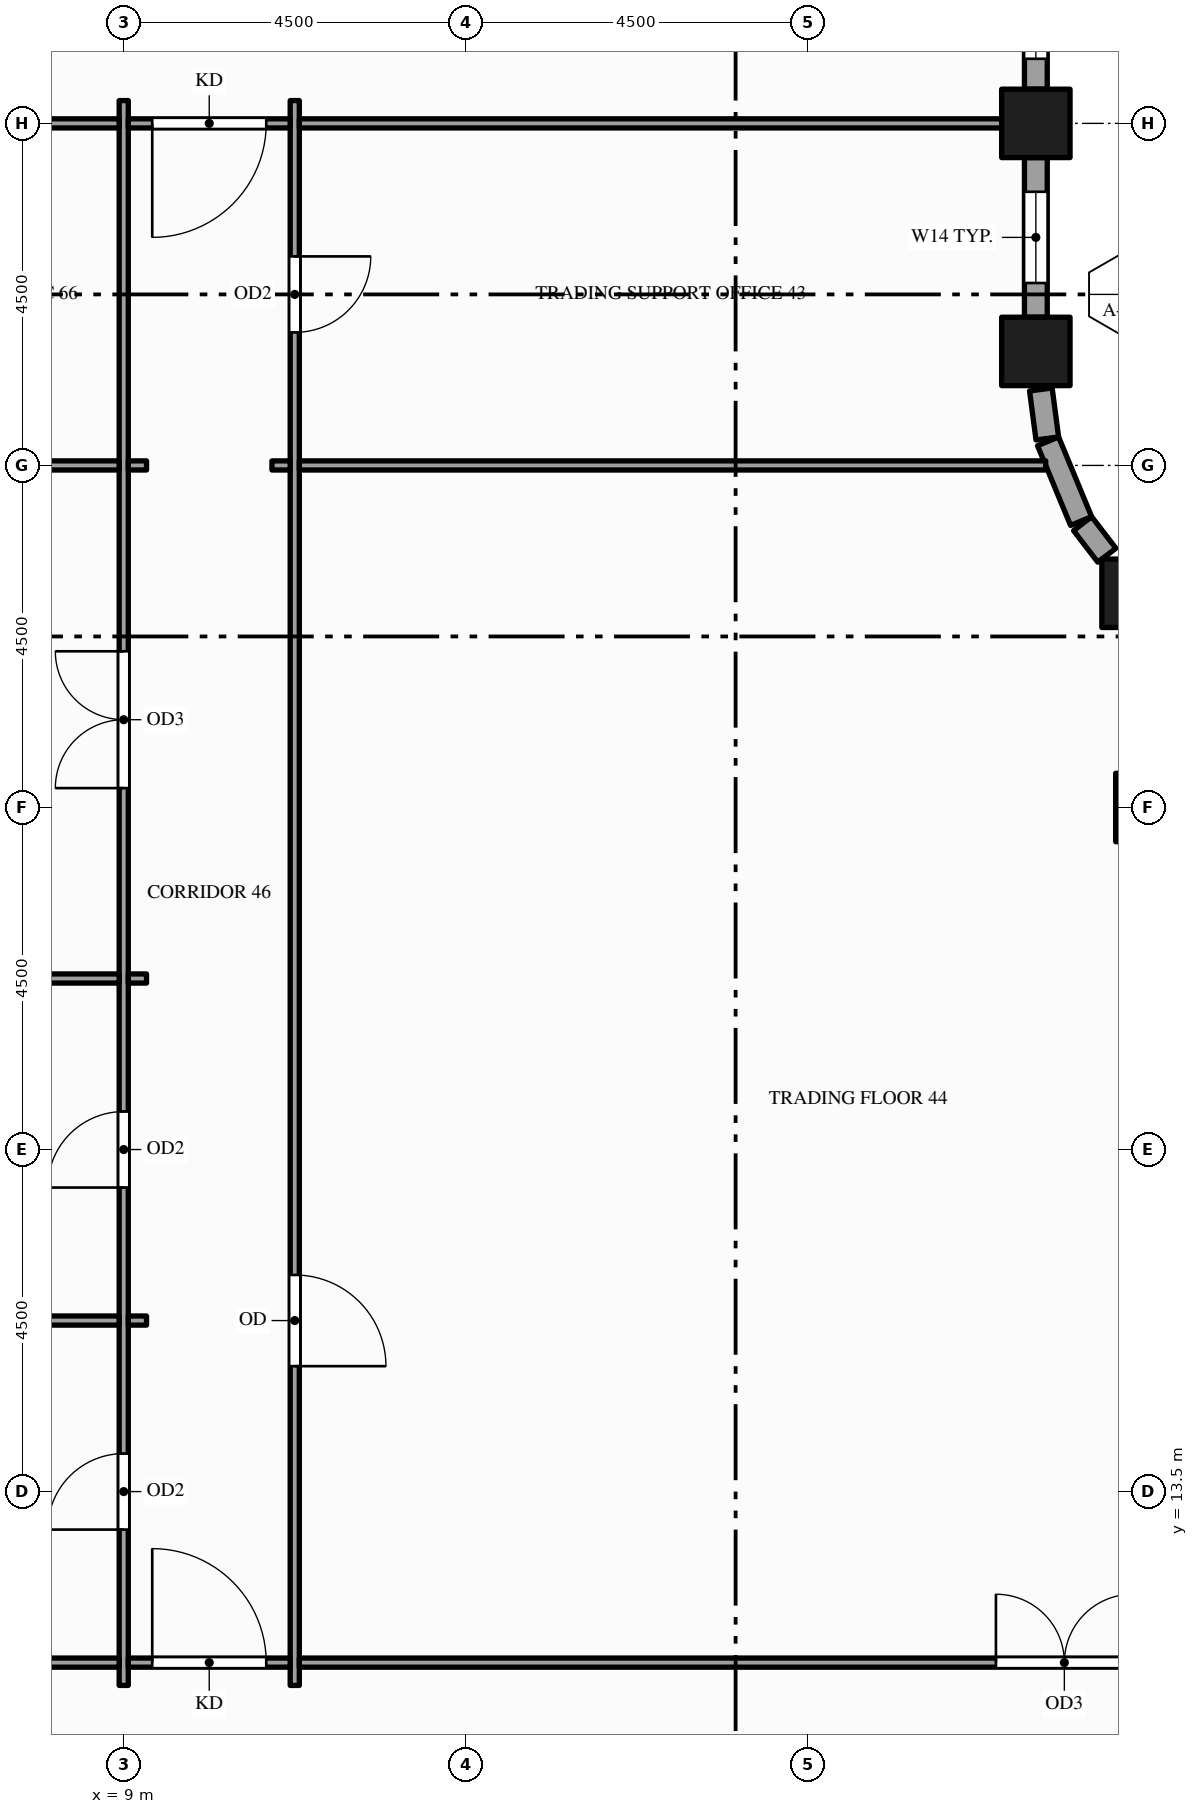
"""IFC4 building model, lengths in metres.
Left out: names, types, materials, properties, quantities, classifications, styles, units other than length and angle.
Written with IfcOpenShell. Run it as: python <this file> out.ifc"""

import sys

from ifc_helpers import new_model, si_unit, direction, frame, frame_2d, origin, origin_2d, place, context, subcontext, project, spatial, rectangle, hollow_rectangle, extrude, element, fill, save


model = new_model("IFC4")
c1 = context("Model", 3, precision=1e-05, world=origin(), true_north=direction((0.0, 1.0)))
c2 = subcontext(c1, "Body", "Model", "MODEL_VIEW")
j1 = project(units=[si_unit("LENGTHUNIT", "METRE"), si_unit("PLANEANGLEUNIT", "RADIAN")], contexts=[c1])
p1 = place(None, origin())
s1 = spatial("IfcSite", under=j1, at=p1, CompositionType="ELEMENT")
p2 = place(p1, origin())
s2 = spatial("IfcBuilding", under=s1, at=p2, CompositionType="ELEMENT")
p3 = place(p2, frame((0.0, 0.0, 147.0)))
s3 = spatial("IfcBuildingStorey", under=s2, at=p3, CompositionType="ELEMENT", Elevation=147.0)
for number, where, z_axis, x_axis in (
    (1, (21.0, 28.5, -0.15), (0.0, 0.0, 1.0), (1.0, 0.0, 0.0)),
    (2, (21.0, 31.5, -0.15), (0.0, 0.0, 1.0), (1.0, 0.0, 0.0)),
    (3, (22.318, 25.318, -0.15), (0.0, 0.0, 1.0), (1.0, 0.0, 0.0)),
    (4, (22.5, 22.5, -0.15), (0.0, 0.0, 1.0), (1.0, 0.0, 0.0)),
):
    element("IfcColumn", number, at=place(p3, frame(where, z_axis=z_axis, x_axis=x_axis)), inside=s3, PredefinedType="COLUMN", context=c2, shape_type="SweptSolid", body=[
        extrude(hollow_rectangle(XDim=0.9, YDim=0.9, WallThickness=0.045, at=origin_2d()), origin(), (0.0, 0.0, 1.0), 4.0),
    ])
p4 = place(p3, frame((21.934, 25.819, 0.0), z_axis=(0.0, 0.0, 1.0), x_axis=(-0.608539141726, 0.793523857856, 0.0)))
e5 = element("IfcWall", 5, at=p4, inside=s3, PredefinedType="STANDARD", context=c2, shape_type="SweptSolid", body=[
    extrude(rectangle(XDim=0.524, YDim=0.3, at=frame_2d((0.262, 0.0))), origin(), (0.0, 0.0, 1.0), 3.149),
])
p5 = place(p3, frame((21.595, 26.268, 0.0), z_axis=(0.0, 0.0, 1.0), x_axis=(-0.382598720491, 0.923914616768, 0.0)))
e6 = element("IfcWall", 6, at=p5, inside=s3, PredefinedType="STANDARD", context=c2, shape_type="SweptSolid", body=[
    extrude(rectangle(XDim=1.135, YDim=0.3, at=frame_2d((0.568, 0.0))), origin(), (0.0, 0.0, 1.0), 3.149),
])
p6 = place(p3, frame((21.151, 27.355, 0.0), z_axis=(0.0, 0.0, 1.0), x_axis=(-0.130687655177, 0.991423590996, 0.0)))
e7 = element("IfcWall", 7, at=p6, inside=s3, PredefinedType="STANDARD", context=c2, shape_type="SweptSolid", body=[
    extrude(rectangle(XDim=0.65, YDim=0.3, at=frame_2d((0.325, 0.0))), origin(), (0.0, 0.0, 1.0), 3.149),
])
p7 = place(p3, frame((21.0, 28.95, 0.0), z_axis=(0.0, 0.0, 1.0), x_axis=(0.0, 1.0, 0.0)))
e8 = element("IfcWall", 8, at=p7, inside=s3, PredefinedType="STANDARD", context=c2, shape_type="SweptSolid", body=[
    extrude(rectangle(XDim=2.1, YDim=0.3, at=frame_2d((1.05, 0.0))), origin(), (0.0, 0.0, 1.0), 3.149),
])
p8 = place(p7, frame((0.45, 0.0, 0.9)))
e9 = element("IfcOpeningElement", 9, at=p8, cuts=e8, PredefinedType="OPENING", context=c2, shape_type="SweptSolid", body=[
    extrude(rectangle(XDim=1.2, YDim=2.0, at=frame_2d((0.6, 1.0))), frame((0.0, 0.16, 0.0), z_axis=(0.0, -1.0, 0.0), x_axis=(1.0, 0.0, 0.0)), (0.0, 0.0, 1.0), 0.32),
])
p9 = place(p3, frame((21.0, 31.95, 0.0), z_axis=(0.0, 0.0, 1.0), x_axis=(0.0, 1.0, 0.0)))
e10 = element("IfcWall", 10, at=p9, inside=s3, PredefinedType="STANDARD", context=c2, shape_type="SweptSolid", body=[
    extrude(rectangle(XDim=4.05, YDim=0.3, at=frame_2d((2.025, 0.0))), origin(), (0.0, 0.0, 1.0), 3.149),
])
p10 = place(p9, frame((0.4, 0.0, 0.9)))
e11 = element("IfcOpeningElement", 11, at=p10, cuts=e10, PredefinedType="OPENING", context=c2, shape_type="SweptSolid", body=[
    extrude(rectangle(XDim=1.1, YDim=2.0, at=frame_2d((0.55, 1.0))), frame((0.0, 0.16, 0.0), z_axis=(0.0, -1.0, 0.0), x_axis=(1.0, 0.0, 0.0)), (0.0, 0.0, 1.0), 0.32),
])
p11 = place(p9, frame((2.1, 0.0, 0.9)))
e12 = element("IfcOpeningElement", 12, at=p11, cuts=e10, PredefinedType="OPENING", context=c2, shape_type="SweptSolid", body=[
    extrude(rectangle(XDim=1.55, YDim=2.0, at=frame_2d((0.775, 1.0))), frame((0.0, 0.16, 0.0), z_axis=(0.0, -1.0, 0.0), x_axis=(1.0, 0.0, 0.0)), (0.0, 0.0, 1.0), 0.32),
])
p12 = place(p3, frame((9.0, 10.95, 0.0), z_axis=(0.0, 0.0, 1.0), x_axis=(0.0, 1.0, 0.0)))
e13 = element("IfcWall", 13, at=p12, inside=s3, PredefinedType="PARTITIONING", context=c2, shape_type="SweptSolid", body=[
    extrude(rectangle(XDim=20.85, YDim=0.12, at=frame_2d((10.425, 0.0))), origin(), (0.0, 0.0, 1.0), 2.6),
])
p13 = place(p12, frame((2.05, 0.0, 0.0)))
e14 = element("IfcOpeningElement", 14, at=p13, cuts=e13, PredefinedType="OPENING", context=c2, shape_type="SweptSolid", body=[
    extrude(rectangle(XDim=1.0, YDim=2.1, at=frame_2d((0.5, 1.05))), frame((0.0, 0.07, 0.0), z_axis=(0.0, -1.0, 0.0), x_axis=(1.0, 0.0, 0.0)), (0.0, 0.0, 1.0), 0.14),
])
p14 = place(p12, frame((6.55, 0.0, 0.0)))
e15 = element("IfcOpeningElement", 15, at=p14, cuts=e13, PredefinedType="OPENING", context=c2, shape_type="SweptSolid", body=[
    extrude(rectangle(XDim=1.0, YDim=2.1, at=frame_2d((0.5, 1.05))), frame((0.0, 0.07, 0.0), z_axis=(0.0, -1.0, 0.0), x_axis=(1.0, 0.0, 0.0)), (0.0, 0.0, 1.0), 0.14),
])
p15 = place(p12, frame((11.805, 0.0, 0.0)))
e16 = element("IfcOpeningElement", 16, at=p15, cuts=e13, PredefinedType="OPENING", context=c2, shape_type="SweptSolid", body=[
    extrude(rectangle(XDim=1.8, YDim=2.1, at=frame_2d((0.9, 1.05))), frame((0.0, 0.07, 0.0), z_axis=(0.0, -1.0, 0.0), x_axis=(1.0, 0.0, 0.0)), (0.0, 0.0, 1.0), 0.14),
])
p16 = place(p3, frame((11.25, 10.95, 0.0), z_axis=(0.0, 0.0, 1.0), x_axis=(0.0, 1.0, 0.0)))
e17 = element("IfcWall", 17, at=p16, inside=s3, PredefinedType="PARTITIONING", context=c2, shape_type="SweptSolid", body=[
    extrude(rectangle(XDim=20.85, YDim=0.12, at=frame_2d((10.425, 0.0))), origin(), (0.0, 0.0, 1.0), 2.6),
])
p17 = place(p16, frame((17.8, 0.0, 0.0)))
e18 = element("IfcOpeningElement", 18, at=p17, cuts=e17, PredefinedType="OPENING", context=c2, shape_type="SweptSolid", body=[
    extrude(rectangle(XDim=1.0, YDim=2.1, at=frame_2d((0.5, 1.05))), frame((0.0, 0.07, 0.0), z_axis=(0.0, -1.0, 0.0), x_axis=(1.0, 0.0, 0.0)), (0.0, 0.0, 1.0), 0.14),
])
p18 = place(p16, frame((4.2, 0.0, 0.0)))
e19 = element("IfcOpeningElement", 19, at=p18, cuts=e17, PredefinedType="OPENING", context=c2, shape_type="SweptSolid", body=[
    extrude(rectangle(XDim=1.2, YDim=2.1, at=frame_2d((0.6, 1.05))), frame((0.0, 0.07, 0.0), z_axis=(0.0, -1.0, 0.0), x_axis=(1.0, 0.0, 0.0)), (0.0, 0.0, 1.0), 0.14),
])
p19 = place(p3, frame((0.15, 11.25, 0.0), z_axis=(0.0, 0.0, 1.0), x_axis=(1.0, 0.0, 0.0)))
e20 = element("IfcWall", 20, at=p19, inside=s3, PredefinedType="PARTITIONING", context=c2, shape_type="SweptSolid", body=[
    extrude(rectangle(XDim=8.79, YDim=0.12, at=frame_2d((4.395, 0.0))), origin(), (0.0, 0.0, 1.0), 2.87),
])
p20 = place(p3, frame((9.06, 11.25, 0.0), z_axis=(0.0, 0.0, 1.0), x_axis=(1.0, 0.0, 0.0)))
e21 = element("IfcWall", 21, at=p20, inside=s3, PredefinedType="PARTITIONING", context=c2, shape_type="SweptSolid", body=[
    extrude(rectangle(XDim=2.13, YDim=0.12, at=frame_2d((1.065, 0.0))), origin(), (0.0, 0.0, 1.0), 2.87),
])
p21 = place(p20, frame((0.315, 0.0, 0.0)))
e22 = element("IfcOpeningElement", 22, at=p21, cuts=e21, PredefinedType="OPENING", context=c2, shape_type="SweptSolid", body=[
    extrude(rectangle(XDim=1.5, YDim=2.1, at=frame_2d((0.75, 1.05))), frame((0.0, 0.07, 0.0), z_axis=(0.0, -1.0, 0.0), x_axis=(1.0, 0.0, 0.0)), (0.0, 0.0, 1.0), 0.14),
])
p22 = place(p3, frame((11.31, 11.25, 0.0), z_axis=(0.0, 0.0, 1.0), x_axis=(1.0, 0.0, 0.0)))
e23 = element("IfcWall", 23, at=p22, inside=s3, PredefinedType="PARTITIONING", context=c2, shape_type="SweptSolid", body=[
    extrude(rectangle(XDim=20.04, YDim=0.12, at=frame_2d((10.02, 0.0))), origin(), (0.0, 0.0, 1.0), 2.87),
])
p23 = place(p22, frame((9.165, 0.0, 0.0)))
e24 = element("IfcOpeningElement", 24, at=p23, cuts=e23, PredefinedType="OPENING", context=c2, shape_type="SweptSolid", body=[
    extrude(rectangle(XDim=1.8, YDim=2.1, at=frame_2d((0.9, 1.05))), frame((0.0, 0.07, 0.0), z_axis=(0.0, -1.0, 0.0), x_axis=(1.0, 0.0, 0.0)), (0.0, 0.0, 1.0), 0.14),
])
p24 = place(p3, frame((0.15, 15.75, 0.0), z_axis=(0.0, 0.0, 1.0), x_axis=(1.0, 0.0, 0.0)))
e25 = element("IfcWall", 25, at=p24, inside=s3, PredefinedType="PARTITIONING", context=c2, shape_type="SweptSolid", body=[
    extrude(rectangle(XDim=8.79, YDim=0.12, at=frame_2d((4.395, 0.0))), origin(), (0.0, 0.0, 1.0), 2.87),
])
p25 = place(p3, frame((9.06, 15.75, 0.0), z_axis=(0.0, 0.0, 1.0), x_axis=(1.0, 0.0, 0.0)))
e26 = element("IfcWall", 26, at=p25, inside=s3, PredefinedType="PARTITIONING", context=c2, shape_type="SweptSolid", body=[
    extrude(rectangle(XDim=0.24, YDim=0.12, at=frame_2d((0.12, 0.0))), origin(), (0.0, 0.0, 1.0), 2.87),
])
p26 = place(p3, frame((0.15, 20.25, 0.0), z_axis=(0.0, 0.0, 1.0), x_axis=(1.0, 0.0, 0.0)))
e27 = element("IfcWall", 27, at=p26, inside=s3, PredefinedType="PARTITIONING", context=c2, shape_type="SweptSolid", body=[
    extrude(rectangle(XDim=8.79, YDim=0.12, at=frame_2d((4.395, 0.0))), origin(), (0.0, 0.0, 1.0), 2.87),
])
p27 = place(p3, frame((9.06, 20.25, 0.0), z_axis=(0.0, 0.0, 1.0), x_axis=(1.0, 0.0, 0.0)))
e28 = element("IfcWall", 28, at=p27, inside=s3, PredefinedType="PARTITIONING", context=c2, shape_type="SweptSolid", body=[
    extrude(rectangle(XDim=0.24, YDim=0.12, at=frame_2d((0.12, 0.0))), origin(), (0.0, 0.0, 1.0), 2.87),
])
p28 = place(p3, frame((5.56, 27.0, 0.0), z_axis=(0.0, 0.0, 1.0), x_axis=(1.0, 0.0, 0.0)))
e29 = element("IfcWall", 29, at=p28, inside=s3, PredefinedType="PARTITIONING", context=c2, shape_type="SweptSolid", body=[
    extrude(rectangle(XDim=3.38, YDim=0.12, at=frame_2d((1.69, 0.0))), origin(), (0.0, 0.0, 1.0), 2.87),
])
for number, where, z_axis, x_axis in (
    (30, (9.06, 27.0, 0.0), (0.0, 0.0, 1.0), (1.0, 0.0, 0.0)),
    (31, (10.95, 27.0, 0.0), (0.0, 0.0, 1.0), (1.0, 0.0, 0.0)),
):
    element("IfcWall", number, at=place(p3, frame(where, z_axis=z_axis, x_axis=x_axis)), inside=s3, PredefinedType="PARTITIONING", context=c2, shape_type="SweptSolid", body=[
        extrude(rectangle(XDim=0.24, YDim=0.12, at=frame_2d((0.12, 0.0))), origin(), (0.0, 0.0, 1.0), 2.87),
    ])
p29 = place(p3, frame((11.31, 27.0, 0.0), z_axis=(0.0, 0.0, 1.0), x_axis=(1.0, 0.0, 0.0)))
e32 = element("IfcWall", 32, at=p29, inside=s3, PredefinedType="PARTITIONING", context=c2, shape_type="SweptSolid", body=[
    extrude(rectangle(XDim=9.82, YDim=0.12, at=frame_2d((4.91, 0.0))), origin(), (0.0, 0.0, 1.0), 2.87),
])
p30 = place(p3, frame((5.56, 31.5, 0.0), z_axis=(0.0, 0.0, 1.0), x_axis=(1.0, 0.0, 0.0)))
e33 = element("IfcWall", 33, at=p30, inside=s3, PredefinedType="PARTITIONING", context=c2, shape_type="SweptSolid", body=[
    extrude(rectangle(XDim=3.38, YDim=0.12, at=frame_2d((1.69, 0.0))), origin(), (0.0, 0.0, 1.0), 2.87),
])
p31 = place(p30, frame((1.19, 0.0, 0.0)))
e34 = element("IfcOpeningElement", 34, at=p31, cuts=e33, PredefinedType="OPENING", context=c2, shape_type="SweptSolid", body=[
    extrude(rectangle(XDim=1.0, YDim=2.1, at=frame_2d((0.5, 1.05))), frame((0.0, 0.07, 0.0), z_axis=(0.0, -1.0, 0.0), x_axis=(1.0, 0.0, 0.0)), (0.0, 0.0, 1.0), 0.14),
])
p32 = place(p3, frame((9.06, 31.5, 0.0), z_axis=(0.0, 0.0, 1.0), x_axis=(1.0, 0.0, 0.0)))
e35 = element("IfcWall", 35, at=p32, inside=s3, PredefinedType="PARTITIONING", context=c2, shape_type="SweptSolid", body=[
    extrude(rectangle(XDim=2.13, YDim=0.12, at=frame_2d((1.065, 0.0))), origin(), (0.0, 0.0, 1.0), 2.87),
])
p33 = place(p32, frame((0.315, 0.0, 0.0)))
e36 = element("IfcOpeningElement", 36, at=p33, cuts=e35, PredefinedType="OPENING", context=c2, shape_type="SweptSolid", body=[
    extrude(rectangle(XDim=1.5, YDim=2.1, at=frame_2d((0.75, 1.05))), frame((0.0, 0.07, 0.0), z_axis=(0.0, -1.0, 0.0), x_axis=(1.0, 0.0, 0.0)), (0.0, 0.0, 1.0), 0.14),
])
p34 = place(p3, frame((11.31, 31.5, 0.0), z_axis=(0.0, 0.0, 1.0), x_axis=(1.0, 0.0, 0.0)))
e37 = element("IfcWall", 37, at=p34, inside=s3, PredefinedType="PARTITIONING", context=c2, shape_type="SweptSolid", body=[
    extrude(rectangle(XDim=9.54, YDim=0.12, at=frame_2d((4.77, 0.0))), origin(), (0.0, 0.0, 1.0), 2.87),
])
p35 = place(p8, origin())
e38 = element("IfcWindow", 38, at=p35, inside=s3, PartitioningType="SINGLE_PANEL", PredefinedType="WINDOW", context=c2, shape_type="SweptSolid", body=[
    extrude(rectangle(XDim=1.2, YDim=2.0, at=frame_2d((0.6, 1.0))), frame((0.0, 0.03, 0.0), z_axis=(0.0, -1.0, 0.0), x_axis=(1.0, 0.0, 0.0)), (0.0, 0.0, 1.0), 0.06),
])
fill(e9, e38)
p36 = place(p10, origin())
e39 = element("IfcWindow", 39, at=p36, inside=s3, PartitioningType="SINGLE_PANEL", PredefinedType="WINDOW", context=c2, shape_type="SweptSolid", body=[
    extrude(rectangle(XDim=1.1, YDim=2.0, at=frame_2d((0.55, 1.0))), frame((0.0, 0.03, 0.0), z_axis=(0.0, -1.0, 0.0), x_axis=(1.0, 0.0, 0.0)), (0.0, 0.0, 1.0), 0.06),
])
fill(e11, e39)
p37 = place(p23, origin())
e40 = element("IfcDoor", 40, at=p37, inside=s3, OperationType="DOUBLE_DOOR_SINGLE_SWING", PredefinedType="DOOR", context=c2, shape_type="SweptSolid", body=[
    extrude(rectangle(XDim=1.8, YDim=2.1, at=frame_2d((0.9, 1.05))), frame((0.0, 0.025, 0.0), z_axis=(0.0, -1.0, 0.0), x_axis=(1.0, 0.0, 0.0)), (0.0, 0.0, 1.0), 0.05),
])
fill(e24, e40)
p38 = place(p21, origin())
e41 = element("IfcDoor", 41, at=p38, inside=s3, OperationType="SINGLE_SWING_LEFT", PredefinedType="DOOR", context=c2, shape_type="SweptSolid", body=[
    extrude(rectangle(XDim=1.5, YDim=2.1, at=frame_2d((0.75, 1.05))), frame((0.0, 0.025, 0.0), z_axis=(0.0, -1.0, 0.0), x_axis=(1.0, 0.0, 0.0)), (0.0, 0.0, 1.0), 0.05),
])
fill(e22, e41)
p39 = place(p33, origin())
e42 = element("IfcDoor", 42, at=p39, inside=s3, OperationType="SINGLE_SWING_LEFT", PredefinedType="DOOR", context=c2, shape_type="SweptSolid", body=[
    extrude(rectangle(XDim=1.5, YDim=2.1, at=frame_2d((0.75, 1.05))), frame((0.0, 0.025, 0.0), z_axis=(0.0, -1.0, 0.0), x_axis=(1.0, 0.0, 0.0)), (0.0, 0.0, 1.0), 0.05),
])
fill(e36, e42)
p40 = place(p13, origin())
e43 = element("IfcDoor", 43, at=p40, inside=s3, OperationType="SINGLE_SWING_LEFT", PredefinedType="DOOR", context=c2, shape_type="SweptSolid", body=[
    extrude(rectangle(XDim=1.0, YDim=2.1, at=frame_2d((0.5, 1.05))), frame((0.0, 0.025, 0.0), z_axis=(0.0, -1.0, 0.0), x_axis=(1.0, 0.0, 0.0)), (0.0, 0.0, 1.0), 0.05),
])
fill(e14, e43)
p41 = place(p14, origin())
e44 = element("IfcDoor", 44, at=p41, inside=s3, OperationType="SINGLE_SWING_LEFT", PredefinedType="DOOR", context=c2, shape_type="SweptSolid", body=[
    extrude(rectangle(XDim=1.0, YDim=2.1, at=frame_2d((0.5, 1.05))), frame((0.0, 0.025, 0.0), z_axis=(0.0, -1.0, 0.0), x_axis=(1.0, 0.0, 0.0)), (0.0, 0.0, 1.0), 0.05),
])
fill(e15, e44)
p42 = place(p15, origin())
e45 = element("IfcDoor", 45, at=p42, inside=s3, OperationType="DOUBLE_DOOR_SINGLE_SWING", PredefinedType="DOOR", context=c2, shape_type="SweptSolid", body=[
    extrude(rectangle(XDim=1.8, YDim=2.1, at=frame_2d((0.9, 1.05))), frame((0.0, 0.025, 0.0), z_axis=(0.0, -1.0, 0.0), x_axis=(1.0, 0.0, 0.0)), (0.0, 0.0, 1.0), 0.05),
])
fill(e16, e45)
p43 = place(p17, origin())
e46 = element("IfcDoor", 46, at=p43, inside=s3, OperationType="SINGLE_SWING_RIGHT", PredefinedType="DOOR", context=c2, shape_type="SweptSolid", body=[
    extrude(rectangle(XDim=1.0, YDim=2.1, at=frame_2d((0.5, 1.05))), frame((0.0, 0.025, 0.0), z_axis=(0.0, -1.0, 0.0), x_axis=(1.0, 0.0, 0.0)), (0.0, 0.0, 1.0), 0.05),
])
fill(e18, e46)
p44 = place(p18, origin())
e47 = element("IfcDoor", 47, at=p44, inside=s3, OperationType="SINGLE_SWING_LEFT", PredefinedType="DOOR", context=c2, shape_type="SweptSolid", body=[
    extrude(rectangle(XDim=1.2, YDim=2.1, at=frame_2d((0.6, 1.05))), frame((0.0, 0.025, 0.0), z_axis=(0.0, -1.0, 0.0), x_axis=(1.0, 0.0, 0.0)), (0.0, 0.0, 1.0), 0.05),
])
fill(e19, e47)
save(model, sys.argv[1])
